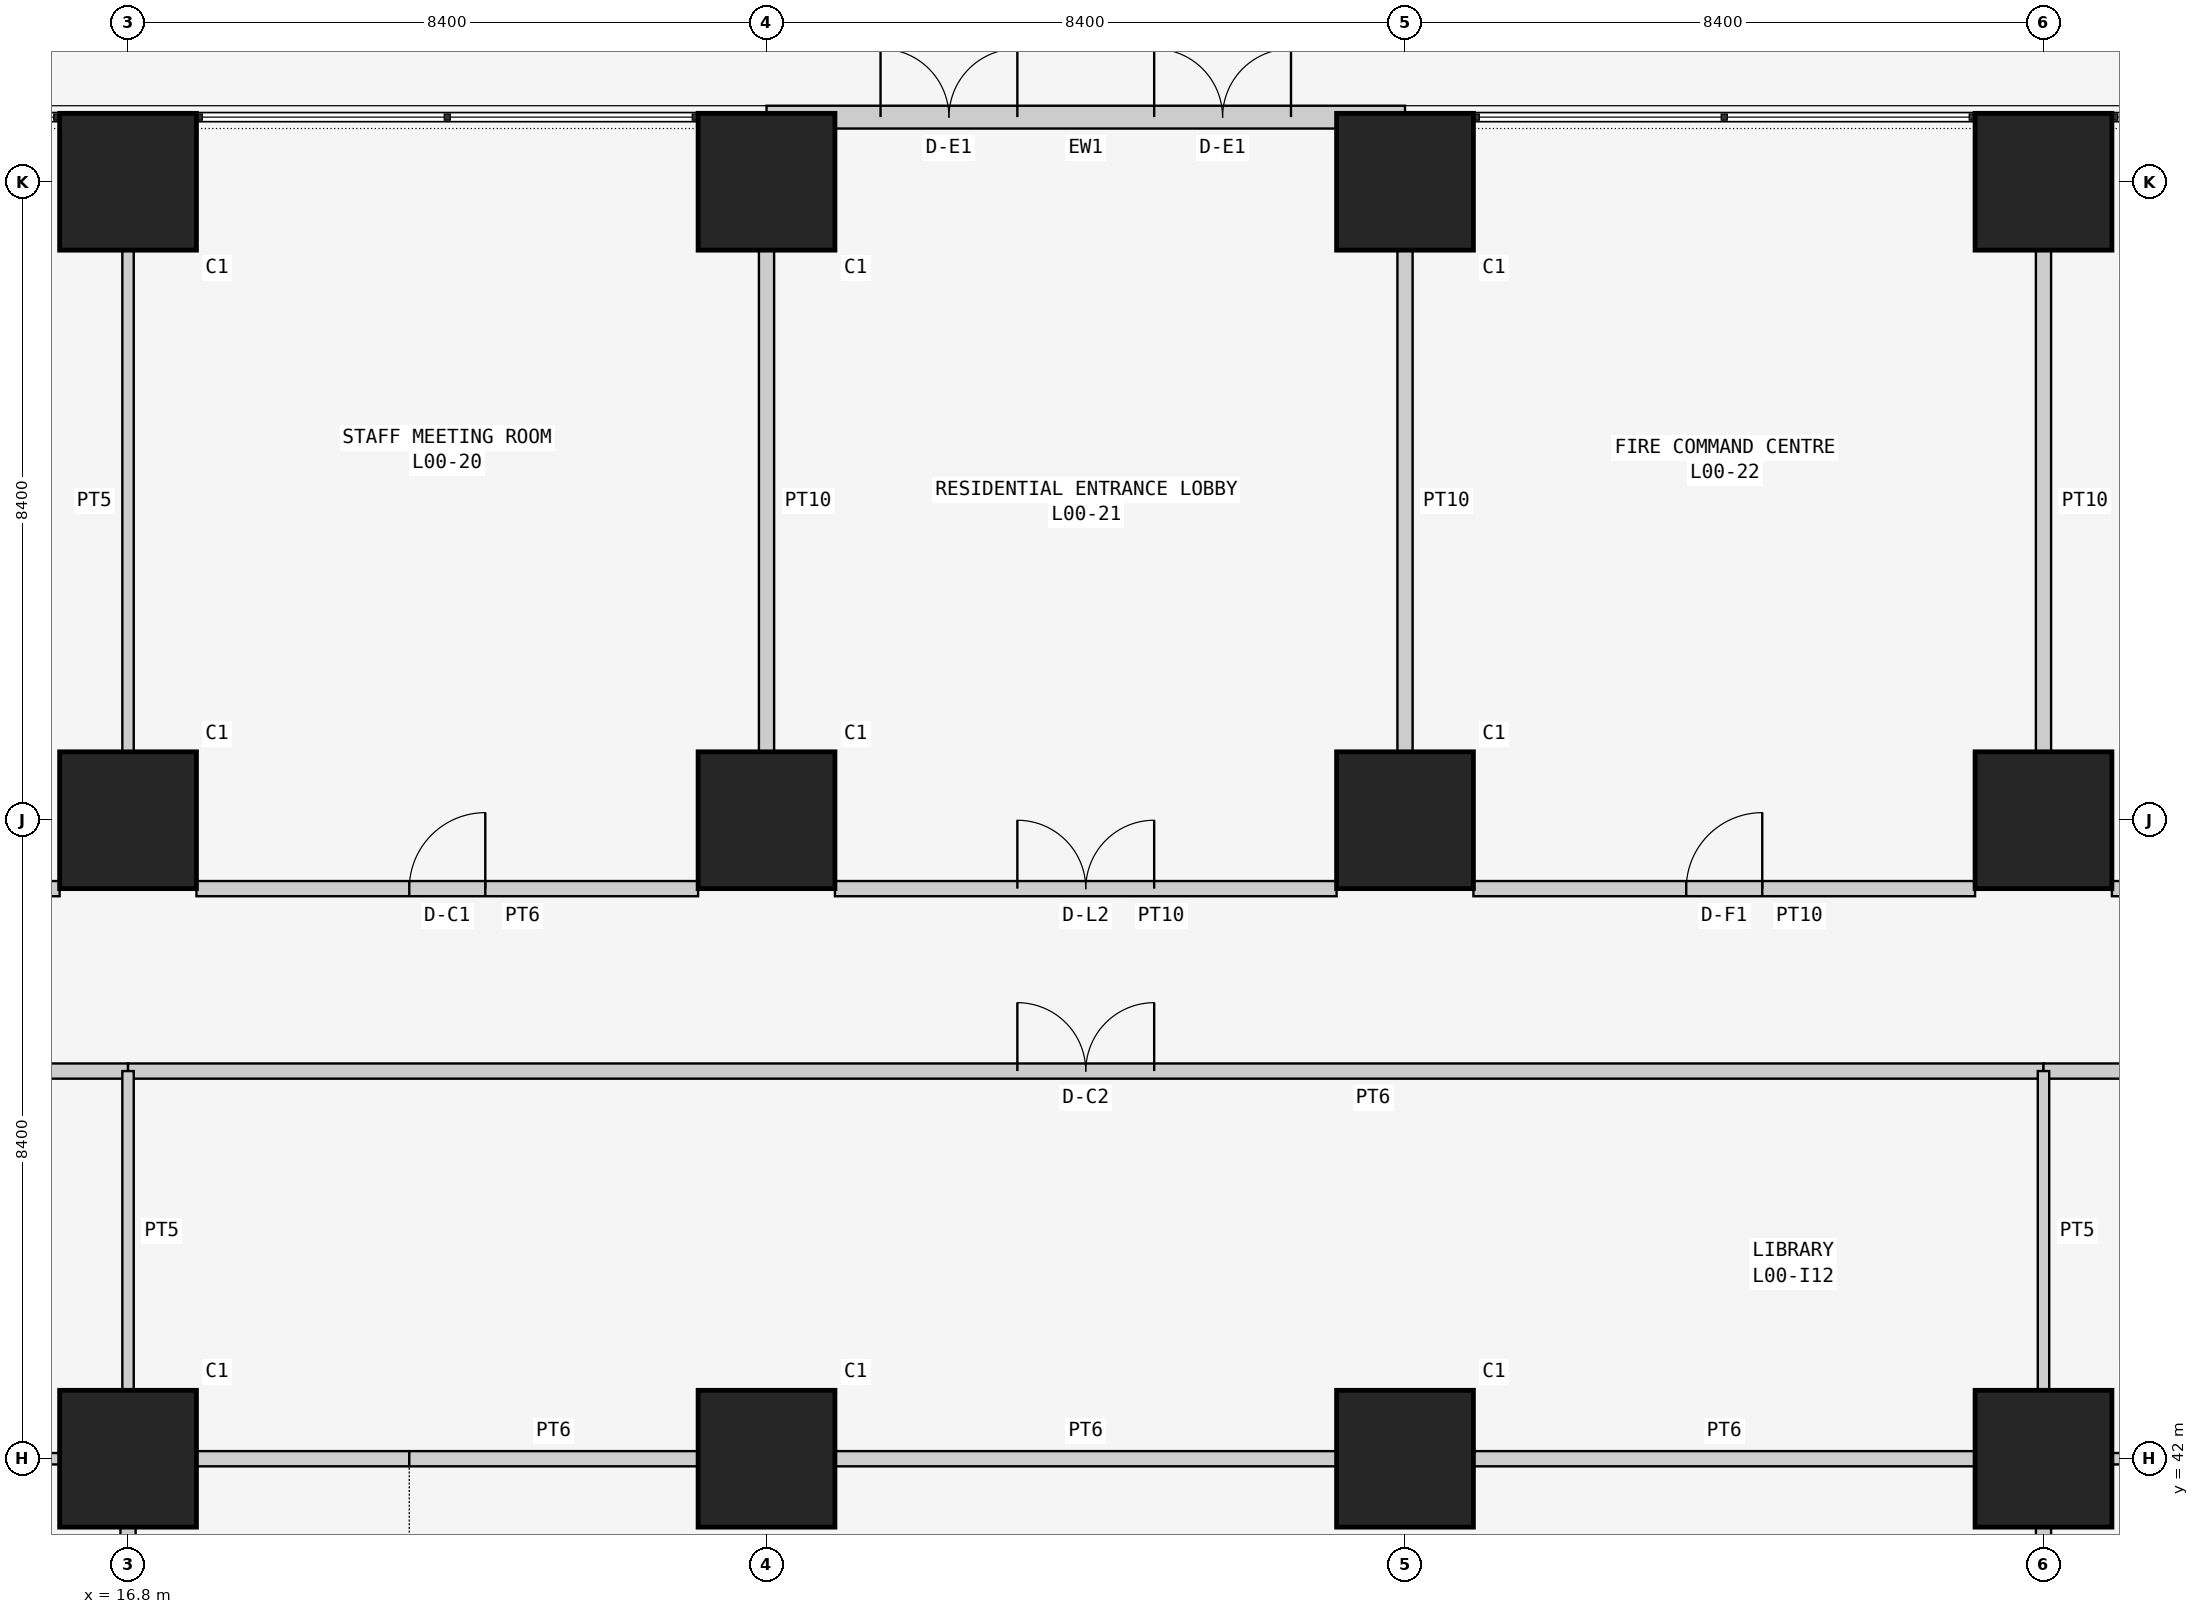
"""IFC4 building model, lengths in metres.
Left out: names, types, materials, properties, quantities, classifications, styles, units other than length and angle.
Written with IfcOpenShell. Run it as: python <this file> out.ifc"""

import sys

from ifc_helpers import new_model, si_unit, direction, frame, frame_2d, origin, origin_2d, place, context, subcontext, project, spatial, rectangle, extrude, element, fill, save


model = new_model("IFC4")
c1 = context("Model", 3, precision=1e-05, world=origin(), true_north=direction((0.0, 1.0)))
c2 = subcontext(c1, "Body", "Model", "MODEL_VIEW")
j1 = project(units=[si_unit("LENGTHUNIT", "METRE"), si_unit("PLANEANGLEUNIT", "RADIAN")], contexts=[c1])
p1 = place(None, origin())
s1 = spatial("IfcSite", under=j1, at=p1, CompositionType="ELEMENT")
p2 = place(p1, origin())
s2 = spatial("IfcBuilding", under=s1, at=p2, CompositionType="ELEMENT")
p3 = place(p2, origin())
s3 = spatial("IfcBuildingStorey", under=s2, at=p3, CompositionType="ELEMENT", Elevation=0.0)
for number, where, z_axis, x_axis in (
    (1, (16.8, 42.0, 0.0), (0.0, 0.0, 1.0), (1.0, 0.0, 0.0)),
    (2, (16.8, 50.4, 0.0), (0.0, 0.0, 1.0), (1.0, 0.0, 0.0)),
    (3, (16.8, 58.8, 0.0), (0.0, 0.0, 1.0), (1.0, 0.0, 0.0)),
    (4, (25.2, 42.0, 0.0), (0.0, 0.0, 1.0), (1.0, 0.0, 0.0)),
    (5, (25.2, 50.4, 0.0), (0.0, 0.0, 1.0), (1.0, 0.0, 0.0)),
    (6, (25.2, 58.8, 0.0), (0.0, 0.0, 1.0), (1.0, 0.0, 0.0)),
    (7, (33.6, 42.0, 0.0), (0.0, 0.0, 1.0), (1.0, 0.0, 0.0)),
    (8, (33.6, 50.4, 0.0), (0.0, 0.0, 1.0), (1.0, 0.0, 0.0)),
    (9, (33.6, 58.8, 0.0), (0.0, 0.0, 1.0), (1.0, 0.0, 0.0)),
    (10, (42.0, 42.0, 0.0), (0.0, 0.0, 1.0), (1.0, 0.0, 0.0)),
    (11, (42.0, 50.4, 0.0), (0.0, 0.0, 1.0), (1.0, 0.0, 0.0)),
    (12, (42.0, 58.8, 0.0), (0.0, 0.0, 1.0), (1.0, 0.0, 0.0)),
):
    element("IfcColumn", number, at=place(p3, frame(where, z_axis=z_axis, x_axis=x_axis)), inside=s3, PredefinedType="COLUMN", context=c2, shape_type="SweptSolid", body=[
        extrude(rectangle(XDim=1.8, YDim=1.8, at=origin_2d()), origin(), (0.0, 0.0, 1.0), 6.0),
    ])
p4 = place(p3, frame((33.6, 59.65, 0.0), z_axis=(0.0, 0.0, 1.0), x_axis=(-1.0, 0.0, 0.0)))
e13 = element("IfcWall", 13, at=p4, inside=s3, PredefinedType="SOLIDWALL", context=c2, shape_type="SweptSolid", body=[
    extrude(rectangle(XDim=8.4, YDim=0.3, at=frame_2d((4.2, 0.0))), origin(), (0.0, 0.0, 1.0), 5.8),
])
p5 = place(p4, frame((5.1, 0.0, 0.0)))
e14 = element("IfcOpeningElement", 14, at=p5, cuts=e13, PredefinedType="OPENING", context=c2, shape_type="SweptSolid", body=[
    extrude(rectangle(XDim=1.8, YDim=2.4, at=frame_2d((0.9, 1.2))), frame((0.0, 0.16, 0.0), z_axis=(0.0, -1.0, 0.0), x_axis=(1.0, 0.0, 0.0)), (0.0, 0.0, 1.0), 0.32),
])
p6 = place(p4, frame((1.5, 0.0, 0.0)))
e15 = element("IfcOpeningElement", 15, at=p6, cuts=e13, PredefinedType="OPENING", context=c2, shape_type="SweptSolid", body=[
    extrude(rectangle(XDim=1.8, YDim=2.4, at=frame_2d((0.9, 1.2))), frame((0.0, 0.16, 0.0), z_axis=(0.0, -1.0, 0.0), x_axis=(1.0, 0.0, 0.0)), (0.0, 0.0, 1.0), 0.32),
])
p7 = place(p3, frame((25.2, 57.9, 0.0), z_axis=(0.0, 0.0, 1.0), x_axis=(0.0, -1.0, 0.0)))
e16 = element("IfcWall", 16, at=p7, inside=s3, PredefinedType="SOLIDWALL", context=c2, shape_type="SweptSolid", body=[
    extrude(rectangle(XDim=6.6, YDim=0.2, at=frame_2d((3.3, 0.0))), origin(), (0.0, 0.0, 1.0), 5.043),
])
p8 = place(p3, frame((16.8, 51.3, 0.0), z_axis=(0.0, 0.0, 1.0), x_axis=(0.0, 1.0, 0.0)))
e17 = element("IfcWall", 17, at=p8, inside=s3, PredefinedType="PARTITIONING", context=c2, shape_type="SweptSolid", body=[
    extrude(rectangle(XDim=6.6, YDim=0.15, at=frame_2d((3.3, 0.0))), origin(), (0.0, 0.0, 1.0), 5.043),
])
p9 = place(p3, frame((24.3, 49.5, 0.0), z_axis=(0.0, 0.0, 1.0), x_axis=(-1.0, 0.0, 0.0)))
e18 = element("IfcWall", 18, at=p9, inside=s3, PredefinedType="PARTITIONING", context=c2, shape_type="SweptSolid", body=[
    extrude(rectangle(XDim=6.6, YDim=0.2, at=frame_2d((3.3, 0.0))), origin(), (0.0, 0.0, 1.0), 5.8),
])
p10 = place(p9, frame((2.8, 0.0, 0.0)))
e19 = element("IfcOpeningElement", 19, at=p10, cuts=e18, PredefinedType="OPENING", context=c2, shape_type="SweptSolid", body=[
    extrude(rectangle(XDim=1.0, YDim=2.1, at=frame_2d((0.5, 1.05))), frame((0.0, 0.11, 0.0), z_axis=(0.0, -1.0, 0.0), x_axis=(1.0, 0.0, 0.0)), (0.0, 0.0, 1.0), 0.22),
])
p11 = place(p3, frame((33.6, 57.9, 0.0), z_axis=(0.0, 0.0, 1.0), x_axis=(0.0, -1.0, 0.0)))
e20 = element("IfcWall", 20, at=p11, inside=s3, PredefinedType="SOLIDWALL", context=c2, shape_type="SweptSolid", body=[
    extrude(rectangle(XDim=6.6, YDim=0.2, at=frame_2d((3.3, 0.0))), origin(), (0.0, 0.0, 1.0), 5.043),
])
p12 = place(p3, frame((32.7, 49.5, 0.0), z_axis=(0.0, 0.0, 1.0), x_axis=(-1.0, 0.0, 0.0)))
e21 = element("IfcWall", 21, at=p12, inside=s3, PredefinedType="SOLIDWALL", context=c2, shape_type="SweptSolid", body=[
    extrude(rectangle(XDim=6.6, YDim=0.2, at=frame_2d((3.3, 0.0))), origin(), (0.0, 0.0, 1.0), 5.8),
])
p13 = place(p12, frame((2.4, 0.0, 0.0)))
e22 = element("IfcOpeningElement", 22, at=p13, cuts=e21, PredefinedType="OPENING", context=c2, shape_type="SweptSolid", body=[
    extrude(rectangle(XDim=1.8, YDim=2.4, at=frame_2d((0.9, 1.2))), frame((0.0, 0.11, 0.0), z_axis=(0.0, -1.0, 0.0), x_axis=(1.0, 0.0, 0.0)), (0.0, 0.0, 1.0), 0.22),
])
p14 = place(p3, frame((42.0, 57.9, 0.0), z_axis=(0.0, 0.0, 1.0), x_axis=(0.0, -1.0, 0.0)))
e23 = element("IfcWall", 23, at=p14, inside=s3, PredefinedType="SOLIDWALL", context=c2, shape_type="SweptSolid", body=[
    extrude(rectangle(XDim=6.6, YDim=0.2, at=frame_2d((3.3, 0.0))), origin(), (0.0, 0.0, 1.0), 5.043),
])
p15 = place(p3, frame((41.1, 49.5, 0.0), z_axis=(0.0, 0.0, 1.0), x_axis=(-1.0, 0.0, 0.0)))
e24 = element("IfcWall", 24, at=p15, inside=s3, PredefinedType="SOLIDWALL", context=c2, shape_type="SweptSolid", body=[
    extrude(rectangle(XDim=6.6, YDim=0.2, at=frame_2d((3.3, 0.0))), origin(), (0.0, 0.0, 1.0), 5.8),
])
p16 = place(p15, frame((2.8, 0.0, 0.0)))
e25 = element("IfcOpeningElement", 25, at=p16, cuts=e24, PredefinedType="OPENING", context=c2, shape_type="SweptSolid", body=[
    extrude(rectangle(XDim=1.0, YDim=2.1, at=frame_2d((0.5, 1.05))), frame((0.0, 0.11, 0.0), z_axis=(0.0, -1.0, 0.0), x_axis=(1.0, 0.0, 0.0)), (0.0, 0.0, 1.0), 0.22),
])
p17 = place(p3, frame((15.9, 49.5, 0.0), z_axis=(0.0, 0.0, 1.0), x_axis=(-1.0, 0.0, 0.0)))
e26 = element("IfcWall", 26, at=p17, inside=s3, PredefinedType="PARTITIONING", context=c2, shape_type="SweptSolid", body=[
    extrude(rectangle(XDim=4.2, YDim=0.2, at=frame_2d((2.1, 0.0))), origin(), (0.0, 0.0, 1.0), 5.8),
])
p18 = place(p17, frame((1.6, 0.0, 0.0)))
e27 = element("IfcOpeningElement", 27, at=p18, cuts=e26, PredefinedType="OPENING", context=c2, shape_type="SweptSolid", body=[
    extrude(rectangle(XDim=1.0, YDim=2.1, at=frame_2d((0.5, 1.05))), frame((0.0, 0.11, 0.0), z_axis=(0.0, -1.0, 0.0), x_axis=(1.0, 0.0, 0.0)), (0.0, 0.0, 1.0), 0.22),
])
p19 = place(p3, frame((47.1, 49.5, 0.0), z_axis=(0.0, 0.0, 1.0), x_axis=(-1.0, 0.0, 0.0)))
e28 = element("IfcWall", 28, at=p19, inside=s3, PredefinedType="PARTITIONING", context=c2, shape_type="SweptSolid", body=[
    extrude(rectangle(XDim=4.2, YDim=0.2, at=frame_2d((2.1, 0.0))), origin(), (0.0, 0.0, 1.0), 5.8),
])
p20 = place(p19, frame((1.6, 0.0, 0.0)))
e29 = element("IfcOpeningElement", 29, at=p20, cuts=e28, PredefinedType="OPENING", context=c2, shape_type="SweptSolid", body=[
    extrude(rectangle(XDim=1.0, YDim=2.1, at=frame_2d((0.5, 1.05))), frame((0.0, 0.11, 0.0), z_axis=(0.0, -1.0, 0.0), x_axis=(1.0, 0.0, 0.0)), (0.0, 0.0, 1.0), 0.22),
])
p21 = place(p3, frame((16.8, 47.1, 0.0), z_axis=(0.0, 0.0, 1.0), x_axis=(-1.0, 0.0, 0.0)))
e30 = element("IfcWall", 30, at=p21, inside=s3, PredefinedType="PARTITIONING", context=c2, shape_type="SweptSolid", body=[
    extrude(rectangle(XDim=5.1, YDim=0.2, at=frame_2d((2.55, 0.0))), origin(), (0.0, 0.0, 1.0), 5.8),
])
p22 = place(p21, frame((2.05, 0.0, 0.0)))
e31 = element("IfcOpeningElement", 31, at=p22, cuts=e30, PredefinedType="OPENING", context=c2, shape_type="SweptSolid", body=[
    extrude(rectangle(XDim=1.0, YDim=2.1, at=frame_2d((0.5, 1.05))), frame((0.0, 0.11, 0.0), z_axis=(0.0, -1.0, 0.0), x_axis=(1.0, 0.0, 0.0)), (0.0, 0.0, 1.0), 0.22),
])
p23 = place(p3, frame((42.0, 47.1, 0.0), z_axis=(0.0, 0.0, 1.0), x_axis=(-1.0, 0.0, 0.0)))
e32 = element("IfcWall", 32, at=p23, inside=s3, PredefinedType="PARTITIONING", context=c2, shape_type="SweptSolid", body=[
    extrude(rectangle(XDim=25.2, YDim=0.2, at=frame_2d((12.6, 0.0))), origin(), (0.0, 0.0, 1.0), 5.8),
])
p24 = place(p23, frame((11.7, 0.0, 0.0)))
e33 = element("IfcOpeningElement", 33, at=p24, cuts=e32, PredefinedType="OPENING", context=c2, shape_type="SweptSolid", body=[
    extrude(rectangle(XDim=1.8, YDim=2.4, at=frame_2d((0.9, 1.2))), frame((0.0, 0.11, 0.0), z_axis=(0.0, -1.0, 0.0), x_axis=(1.0, 0.0, 0.0)), (0.0, 0.0, 1.0), 0.22),
])
p25 = place(p3, frame((47.1, 47.1, 0.0), z_axis=(0.0, 0.0, 1.0), x_axis=(-1.0, 0.0, 0.0)))
e34 = element("IfcWall", 34, at=p25, inside=s3, PredefinedType="PARTITIONING", context=c2, shape_type="SweptSolid", body=[
    extrude(rectangle(XDim=5.1, YDim=0.2, at=frame_2d((2.55, 0.0))), origin(), (0.0, 0.0, 1.0), 5.8),
])
p26 = place(p3, frame((16.8, 34.5, 0.0), z_axis=(0.0, 0.0, 1.0), x_axis=(0.0, 1.0, 0.0)))
e35 = element("IfcWall", 35, at=p26, inside=s3, PredefinedType="PARTITIONING", context=c2, shape_type="SweptSolid", body=[
    extrude(rectangle(XDim=6.6, YDim=0.2, at=frame_2d((3.3, 0.0))), origin(), (0.0, 0.0, 1.0), 5.043),
])
p27 = place(p3, frame((17.7, 42.0, 0.0), z_axis=(0.0, 0.0, 1.0), x_axis=(1.0, 0.0, 0.0)))
e36 = element("IfcWall", 36, at=p27, inside=s3, PredefinedType="PARTITIONING", context=c2, shape_type="SweptSolid", body=[
    extrude(rectangle(XDim=2.8, YDim=0.2, at=frame_2d((1.4, 0.0))), origin(), (0.0, 0.0, 1.0), 5.043),
])
p28 = place(p3, frame((42.0, 41.1, 0.0), z_axis=(0.0, 0.0, 1.0), x_axis=(0.0, -1.0, 0.0)))
e37 = element("IfcWall", 37, at=p28, inside=s3, PredefinedType="PARTITIONING", context=c2, shape_type="SweptSolid", body=[
    extrude(rectangle(XDim=6.6, YDim=0.2, at=frame_2d((3.3, 0.0))), origin(), (0.0, 0.0, 1.0), 5.043),
])
p29 = place(p3, frame((20.5, 42.0, 0.0), z_axis=(0.0, 0.0, 1.0), x_axis=(1.0, 0.0, 0.0)))
e38 = element("IfcWall", 38, at=p29, inside=s3, PredefinedType="PARTITIONING", context=c2, shape_type="SweptSolid", body=[
    extrude(rectangle(XDim=3.8, YDim=0.2, at=frame_2d((1.9, 0.0))), origin(), (0.0, 0.0, 1.0), 5.043),
])
p30 = place(p3, frame((26.1, 42.0, 0.0), z_axis=(0.0, 0.0, 1.0), x_axis=(1.0, 0.0, 0.0)))
e39 = element("IfcWall", 39, at=p30, inside=s3, PredefinedType="PARTITIONING", context=c2, shape_type="SweptSolid", body=[
    extrude(rectangle(XDim=6.6, YDim=0.2, at=frame_2d((3.3, 0.0))), origin(), (0.0, 0.0, 1.0), 5.043),
])
p31 = place(p3, frame((34.5, 42.0, 0.0), z_axis=(0.0, 0.0, 1.0), x_axis=(1.0, 0.0, 0.0)))
e40 = element("IfcWall", 40, at=p31, inside=s3, PredefinedType="PARTITIONING", context=c2, shape_type="SweptSolid", body=[
    extrude(rectangle(XDim=6.6, YDim=0.2, at=frame_2d((3.3, 0.0))), origin(), (0.0, 0.0, 1.0), 5.043),
])
p32 = place(p3, frame((11.7, 42.0, 0.0), z_axis=(0.0, 0.0, 1.0), x_axis=(1.0, 0.0, 0.0)))
e41 = element("IfcWall", 41, at=p32, inside=s3, PredefinedType="PARTITIONING", context=c2, shape_type="SweptSolid", body=[
    extrude(rectangle(XDim=4.2, YDim=0.15, at=frame_2d((2.1, 0.0))), origin(), (0.0, 0.0, 1.0), 5.043),
])
for number, where, z_axis, x_axis in (
    (42, (42.9, 42.0, 0.0), (0.0, 0.0, 1.0), (1.0, 0.0, 0.0)),
    (43, (16.8, 47.1, 0.0), (0.0, 0.0, 1.0), (0.0, -1.0, 0.0)),
    (44, (42.0, 47.1, 0.0), (0.0, 0.0, 1.0), (0.0, -1.0, 0.0)),
):
    element("IfcWall", number, at=place(p3, frame(where, z_axis=z_axis, x_axis=x_axis)), inside=s3, PredefinedType="PARTITIONING", context=c2, shape_type="SweptSolid", body=[
        extrude(rectangle(XDim=4.2, YDim=0.15, at=frame_2d((2.1, 0.0))), origin(), (0.0, 0.0, 1.0), 5.043),
    ])
p33 = place(p5, frame((1.8, 0.0, 0.0), z_axis=(0.0, 0.0, 1.0), x_axis=(-1.0, 0.0, 0.0)))
e45 = element("IfcDoor", 45, at=p33, inside=s3, OperationType="DOUBLE_DOOR_SINGLE_SWING", PredefinedType="DOOR", context=c2, shape_type="SweptSolid", body=[
    extrude(rectangle(XDim=1.8, YDim=2.4, at=frame_2d((0.9, 1.2))), frame((0.0, 0.025, 0.0), z_axis=(0.0, -1.0, 0.0), x_axis=(1.0, 0.0, 0.0)), (0.0, 0.0, 1.0), 0.05),
])
fill(e14, e45)
p34 = place(p6, frame((1.8, 0.0, 0.0), z_axis=(0.0, 0.0, 1.0), x_axis=(-1.0, 0.0, 0.0)))
e46 = element("IfcDoor", 46, at=p34, inside=s3, OperationType="DOUBLE_DOOR_SINGLE_SWING", PredefinedType="DOOR", context=c2, shape_type="SweptSolid", body=[
    extrude(rectangle(XDim=1.8, YDim=2.4, at=frame_2d((0.9, 1.2))), frame((0.0, 0.025, 0.0), z_axis=(0.0, -1.0, 0.0), x_axis=(1.0, 0.0, 0.0)), (0.0, 0.0, 1.0), 0.05),
])
fill(e15, e46)
p35 = place(p10, frame((1.0, 0.0, 0.0), z_axis=(0.0, 0.0, 1.0), x_axis=(-1.0, 0.0, 0.0)))
e47 = element("IfcDoor", 47, at=p35, inside=s3, OperationType="SINGLE_SWING_RIGHT", PredefinedType="DOOR", context=c2, shape_type="SweptSolid", body=[
    extrude(rectangle(XDim=1.0, YDim=2.1, at=frame_2d((0.5, 1.05))), frame((0.0, 0.025, 0.0), z_axis=(0.0, -1.0, 0.0), x_axis=(1.0, 0.0, 0.0)), (0.0, 0.0, 1.0), 0.05),
])
fill(e19, e47)
p36 = place(p13, frame((1.8, 0.0, 0.0), z_axis=(0.0, 0.0, 1.0), x_axis=(-1.0, 0.0, 0.0)))
e48 = element("IfcDoor", 48, at=p36, inside=s3, OperationType="DOUBLE_DOOR_SINGLE_SWING", PredefinedType="DOOR", context=c2, shape_type="SweptSolid", body=[
    extrude(rectangle(XDim=1.8, YDim=2.4, at=frame_2d((0.9, 1.2))), frame((0.0, 0.025, 0.0), z_axis=(0.0, -1.0, 0.0), x_axis=(1.0, 0.0, 0.0)), (0.0, 0.0, 1.0), 0.05),
])
fill(e22, e48)
p37 = place(p16, frame((1.0, 0.0, 0.0), z_axis=(0.0, 0.0, 1.0), x_axis=(-1.0, 0.0, 0.0)))
e49 = element("IfcDoor", 49, at=p37, inside=s3, OperationType="SINGLE_SWING_RIGHT", PredefinedType="DOOR", context=c2, shape_type="SweptSolid", body=[
    extrude(rectangle(XDim=1.0, YDim=2.1, at=frame_2d((0.5, 1.05))), frame((0.0, 0.025, 0.0), z_axis=(0.0, -1.0, 0.0), x_axis=(1.0, 0.0, 0.0)), (0.0, 0.0, 1.0), 0.05),
])
fill(e25, e49)
p38 = place(p24, frame((1.8, 0.0, 0.0), z_axis=(0.0, 0.0, 1.0), x_axis=(-1.0, 0.0, 0.0)))
e50 = element("IfcDoor", 50, at=p38, inside=s3, OperationType="DOUBLE_DOOR_SINGLE_SWING", PredefinedType="DOOR", context=c2, shape_type="SweptSolid", body=[
    extrude(rectangle(XDim=1.8, YDim=2.4, at=frame_2d((0.9, 1.2))), frame((0.0, 0.025, 0.0), z_axis=(0.0, -1.0, 0.0), x_axis=(1.0, 0.0, 0.0)), (0.0, 0.0, 1.0), 0.05),
])
fill(e33, e50)
save(model, sys.argv[1])
